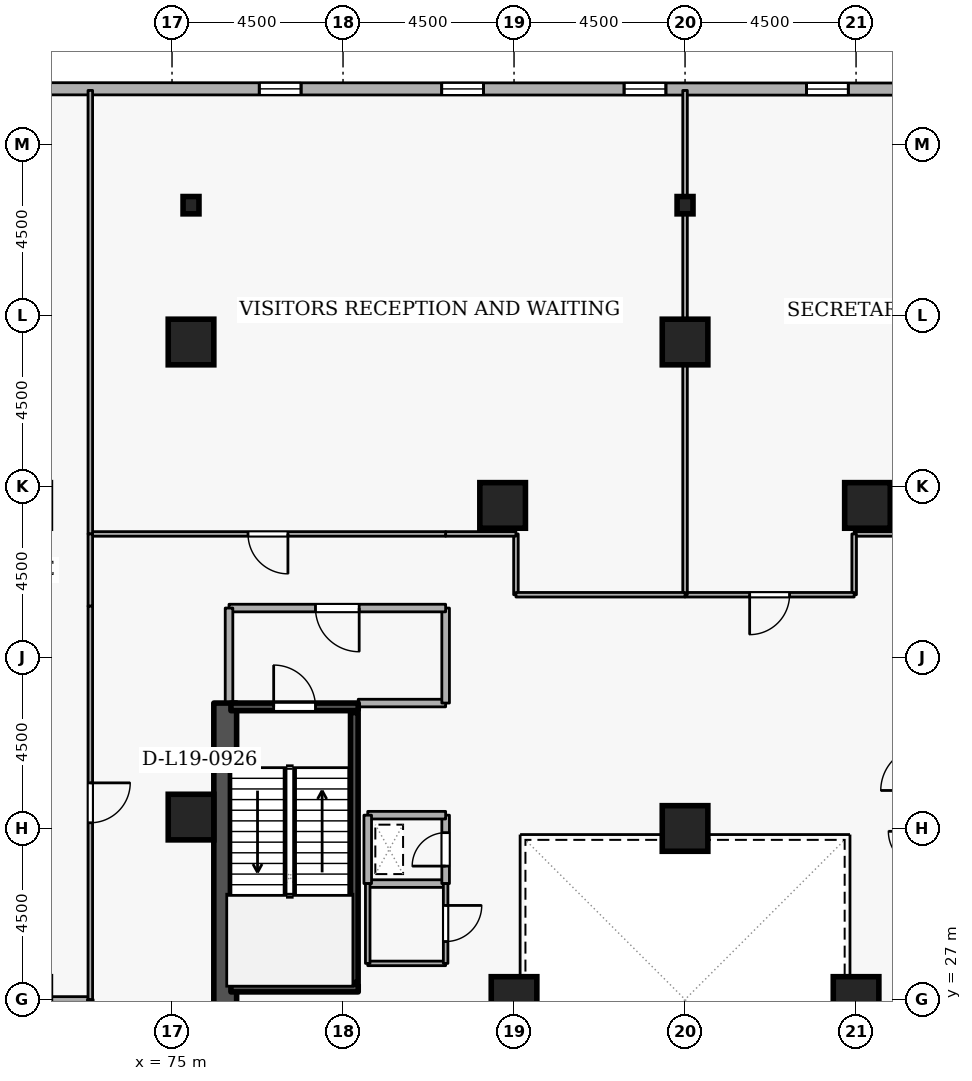
"""IFC4 building model, lengths in metres.
Left out: names, types, materials, properties, quantities, classifications, styles, units other than length and angle.
Written with IfcOpenShell. Run it as: python <this file> out.ifc"""

import sys

from ifc_helpers import new_model, si_unit, direction, frame, frame_2d, origin, origin_2d, place, context, subcontext, project, spatial, rectangle, i_section, extrude, element, fill, save


model = new_model("IFC4")
c1 = context("Model", 3, precision=1e-05, world=origin(), true_north=direction((0.0, 1.0)))
c2 = subcontext(c1, "Body", "Model", "MODEL_VIEW")
j1 = project(units=[si_unit("LENGTHUNIT", "METRE"), si_unit("PLANEANGLEUNIT", "RADIAN")], contexts=[c1])
p1 = place(None, origin())
s1 = spatial("IfcSite", under=j1, at=p1, CompositionType="ELEMENT")
p2 = place(p1, origin())
s2 = spatial("IfcBuilding", under=s1, at=p2, CompositionType="ELEMENT")
p3 = place(p2, frame((0.0, 0.0, 75.9)))
s3 = spatial("IfcBuildingStorey", under=s2, at=p3, CompositionType="ELEMENT", Elevation=75.9)
p4 = place(p3, frame((76.4, 19.2, 0.0), z_axis=(0.0, 0.0, 1.0), x_axis=(0.0, 1.0, 0.0)))
e1 = element("IfcWall", 1, at=p4, inside=s3, PredefinedType="SHEAR", context=c2, shape_type="SweptSolid", body=[
    extrude(rectangle(XDim=15.6, YDim=0.6, at=frame_2d((7.8, 0.0))), origin(), (0.0, 0.0, 1.0), 4.2),
])
for number, where, z_axis, x_axis in (
    (2, (88.5, 44.3, 0.0), (0.0, 0.0, 1.0), (1.0, 0.0, 0.0)),
    (3, (75.5, 44.3, 0.0), (0.0, 0.0, 1.0), (1.0, 0.0, 0.0)),
    (4, (93.3, 40.0, 0.0), (0.0, 0.0, 1.0), (1.0, 0.0, 0.0)),
    (5, (83.7, 40.0, 0.0), (0.0, 0.0, 1.0), (1.0, 0.0, 0.0)),
    (6, (75.5, 31.8, 0.0), (0.0, 0.0, 1.0), (1.0, 0.0, 0.0)),
    (7, (93.0, 27.0, 0.0), (0.0, 0.0, 1.0), (1.0, 0.0, 0.0)),
    (8, (84.0, 27.0, 0.0), (0.0, 0.0, 1.0), (1.0, 0.0, 0.0)),
    (9, (88.5, 31.5, 0.0), (0.0, 0.0, 1.0), (1.0, 0.0, 0.0)),
):
    element("IfcColumn", number, at=place(p3, frame(where, z_axis=z_axis, x_axis=x_axis)), inside=s3, PredefinedType="COLUMN", context=c2, shape_type="SweptSolid", body=[
        extrude(rectangle(XDim=1.2, YDim=1.2, at=origin_2d()), origin(), (0.0, 0.0, 1.0), 4.2),
    ])
for number, where, z_axis, x_axis in (
    (10, (88.5, 47.9, 0.0), (0.0, 0.0, 1.0), (1.0, 0.0, 0.0)),
    (11, (75.5, 47.9, 0.0), (0.0, 0.0, 1.0), (1.0, 0.0, 0.0)),
):
    element("IfcColumn", number, at=place(p3, frame(where, z_axis=z_axis, x_axis=x_axis)), inside=s3, PredefinedType="COLUMN", context=c2, shape_type="SweptSolid", body=[
        extrude(i_section(OverallWidth=0.418, OverallDepth=0.456, WebThickness=0.042, FlangeThickness=0.067, FilletRadius=0.015, at=origin_2d()), origin(), (0.0, 0.0, 1.0), 4.2),
    ])
p5 = place(p3, frame((100.296, 50.953, 0.0), z_axis=(0.0, 0.0, 1.0), x_axis=(-0.99999993762, 0.000353213856, 0.0)))
e12 = element("IfcWall", 12, at=p5, inside=s3, PredefinedType="STANDARD", context=c2, shape_type="SweptSolid", body=[
    extrude(rectangle(XDim=33.177, YDim=0.32, at=frame_2d((16.589, 0.0))), origin(), (0.0, 0.0, 1.0), 3.3),
])
p6 = place(p5, frame((2.7, 0.0, 0.72)))
e13 = element("IfcOpeningElement", 13, at=p6, cuts=e12, PredefinedType="OPENING", context=c2, shape_type="SweptSolid", body=[
    extrude(rectangle(XDim=1.1, YDim=1.8, at=frame_2d((0.55, 0.9))), frame((0.0, 0.17, 0.0), z_axis=(0.0, -1.0, 0.0), x_axis=(1.0, 0.0, 0.0)), (0.0, 0.0, 1.0), 0.34),
])
p7 = place(p5, frame((7.5, 0.0, 0.72)))
e14 = element("IfcOpeningElement", 14, at=p7, cuts=e12, PredefinedType="OPENING", context=c2, shape_type="SweptSolid", body=[
    extrude(rectangle(XDim=1.1, YDim=1.8, at=frame_2d((0.55, 0.9))), frame((0.0, 0.17, 0.0), z_axis=(0.0, -1.0, 0.0), x_axis=(1.0, 0.0, 0.0)), (0.0, 0.0, 1.0), 0.34),
])
p8 = place(p5, frame((12.3, 0.0, 0.72)))
e15 = element("IfcOpeningElement", 15, at=p8, cuts=e12, PredefinedType="OPENING", context=c2, shape_type="SweptSolid", body=[
    extrude(rectangle(XDim=1.1, YDim=1.8, at=frame_2d((0.55, 0.9))), frame((0.0, 0.17, 0.0), z_axis=(0.0, -1.0, 0.0), x_axis=(1.0, 0.0, 0.0)), (0.0, 0.0, 1.0), 0.34),
])
p9 = place(p5, frame((17.1, 0.0, 0.72)))
e16 = element("IfcOpeningElement", 16, at=p9, cuts=e12, PredefinedType="OPENING", context=c2, shape_type="SweptSolid", body=[
    extrude(rectangle(XDim=1.1, YDim=1.8, at=frame_2d((0.55, 0.9))), frame((0.0, 0.17, 0.0), z_axis=(0.0, -1.0, 0.0), x_axis=(1.0, 0.0, 0.0)), (0.0, 0.0, 1.0), 0.34),
])
p10 = place(p5, frame((21.9, 0.0, 0.72)))
e17 = element("IfcOpeningElement", 17, at=p10, cuts=e12, PredefinedType="OPENING", context=c2, shape_type="SweptSolid", body=[
    extrude(rectangle(XDim=1.1, YDim=1.8, at=frame_2d((0.55, 0.9))), frame((0.0, 0.17, 0.0), z_axis=(0.0, -1.0, 0.0), x_axis=(1.0, 0.0, 0.0)), (0.0, 0.0, 1.0), 0.34),
])
p11 = place(p3, frame((76.55, 34.7, 0.0), z_axis=(0.0, 0.0, 1.0), x_axis=(1.0, 0.0, 0.0)))
e18 = element("IfcWall", 18, at=p11, inside=s3, PredefinedType="SHEAR", context=c2, shape_type="SweptSolid", body=[
    extrude(rectangle(XDim=3.35, YDim=0.2, at=frame_2d((1.675, 0.0))), origin(), (0.0, 0.0, 1.0), 4.2),
])
p12 = place(p11, frame((1.125, 0.0, 0.0)))
e19 = element("IfcOpeningElement", 19, at=p12, cuts=e18, PredefinedType="OPENING", context=c2, shape_type="SweptSolid", body=[
    extrude(rectangle(XDim=1.1, YDim=2.1, at=frame_2d((0.55, 1.05))), frame((0.0, 0.11, 0.0), z_axis=(0.0, -1.0, 0.0), x_axis=(1.0, 0.0, 0.0)), (0.0, 0.0, 1.0), 0.22),
])
p13 = place(p3, frame((79.9, 27.3, 0.0), z_axis=(0.0, 0.0, 1.0), x_axis=(-1.0, 0.0, 0.0)))
e20 = element("IfcWall", 20, at=p13, inside=s3, PredefinedType="SHEAR", context=c2, shape_type="SweptSolid", body=[
    extrude(rectangle(XDim=3.35, YDim=0.2, at=frame_2d((1.675, 0.0))), origin(), (0.0, 0.0, 1.0), 4.2),
])
p14 = place(p3, frame((79.797, 27.45, 0.0), z_axis=(0.0, 0.0, 1.0), x_axis=(0.0, 1.0, 0.0)))
e21 = element("IfcWall", 21, at=p14, inside=s3, PredefinedType="SHEAR", context=c2, shape_type="SweptSolid", body=[
    extrude(rectangle(XDim=7.1, YDim=0.2, at=frame_2d((3.55, 0.0))), origin(), (0.0, 0.0, 1.0), 4.2),
])
p15 = place(p3, frame((79.9, 34.8, 0.0), z_axis=(0.0, 0.0, 1.0), x_axis=(1.0, 0.0, 0.0)))
e22 = element("IfcWall", 22, at=p15, inside=s3, PredefinedType="STANDARD", context=c2, shape_type="SweptSolid", body=[
    extrude(rectangle(XDim=2.3, YDim=0.2, at=frame_2d((1.15, 0.0))), origin(), (0.0, 0.0, 1.0), 3.145),
])
p16 = place(p3, frame((82.2, 34.8, 0.0), z_axis=(0.0, 0.0, 1.0), x_axis=(0.0, 1.0, 0.0)))
e23 = element("IfcWall", 23, at=p16, inside=s3, PredefinedType="STANDARD", context=c2, shape_type="SweptSolid", body=[
    extrude(rectangle(XDim=2.5, YDim=0.2, at=frame_2d((1.25, 0.0))), origin(), (0.0, 0.0, 1.0), 3.94),
])
p17 = place(p3, frame((82.2, 37.3, 0.0), z_axis=(0.0, 0.0, 1.0), x_axis=(-1.0, 0.0, 0.0)))
e24 = element("IfcWall", 24, at=p17, inside=s3, PredefinedType="STANDARD", context=c2, shape_type="SweptSolid", body=[
    extrude(rectangle(XDim=5.7, YDim=0.2, at=frame_2d((2.85, 0.0))), origin(), (0.0, 0.0, 1.0), 3.94),
])
p18 = place(p17, frame((2.275, 0.0, 0.0)))
e25 = element("IfcOpeningElement", 25, at=p18, cuts=e24, PredefinedType="OPENING", context=c2, shape_type="SweptSolid", body=[
    extrude(rectangle(XDim=1.15, YDim=2.1, at=frame_2d((0.575, 1.05))), frame((0.0, 0.11, 0.0), z_axis=(0.0, -1.0, 0.0), x_axis=(1.0, 0.0, 0.0)), (0.0, 0.0, 1.0), 0.22),
])
p19 = place(p3, frame((76.5, 37.3, 0.0), z_axis=(0.0, 0.0, 1.0), x_axis=(0.0, -1.0, 0.0)))
e26 = element("IfcWall", 26, at=p19, inside=s3, PredefinedType="STANDARD", context=c2, shape_type="SweptSolid", body=[
    extrude(rectangle(XDim=2.5, YDim=0.2, at=frame_2d((1.25, 0.0))), origin(), (0.0, 0.0, 1.0), 3.94),
])
p20 = place(p3, frame((80.15, 30.05, 0.0), z_axis=(0.0, 0.0, 1.0), x_axis=(1.0, 0.0, 0.0)))
e27 = element("IfcWall", 27, at=p20, inside=s3, PredefinedType="STANDARD", context=c2, shape_type="SweptSolid", body=[
    extrude(rectangle(XDim=2.05, YDim=0.2, at=frame_2d((1.025, 0.0))), origin(), (0.0, 0.0, 1.0), 3.94),
])
p21 = place(p3, frame((82.2, 30.05, 0.0), z_axis=(0.0, 0.0, 1.0), x_axis=(0.0, 1.0, 0.0)))
e28 = element("IfcWall", 28, at=p21, inside=s3, PredefinedType="STANDARD", context=c2, shape_type="SweptSolid", body=[
    extrude(rectangle(XDim=1.8, YDim=0.2, at=frame_2d((0.9, 0.0))), origin(), (0.0, 0.0, 1.0), 3.94),
])
p22 = place(p21, frame((0.46, 0.0, 0.0)))
e29 = element("IfcOpeningElement", 29, at=p22, cuts=e28, PredefinedType="OPENING", context=c2, shape_type="SweptSolid", body=[
    extrude(rectangle(XDim=0.88, YDim=2.04, at=frame_2d((0.44, 1.02))), frame((0.0, 0.11, 0.0), z_axis=(0.0, -1.0, 0.0), x_axis=(1.0, 0.0, 0.0)), (0.0, 0.0, 1.0), 0.22),
])
p23 = place(p3, frame((82.2, 31.85, 0.0), z_axis=(0.0, 0.0, 1.0), x_axis=(-1.0, 0.0, 0.0)))
e30 = element("IfcWall", 30, at=p23, inside=s3, PredefinedType="STANDARD", context=c2, shape_type="SweptSolid", body=[
    extrude(rectangle(XDim=2.05, YDim=0.2, at=frame_2d((1.025, 0.0))), origin(), (0.0, 0.0, 1.0), 3.94),
])
p24 = place(p3, frame((80.15, 31.85, 0.0), z_axis=(0.0, 0.0, 1.0), x_axis=(0.0, -1.0, 0.0)))
e31 = element("IfcWall", 31, at=p24, inside=s3, PredefinedType="STANDARD", context=c2, shape_type="SweptSolid", body=[
    extrude(rectangle(XDim=1.8, YDim=0.2, at=frame_2d((0.9, 0.0))), origin(), (0.0, 0.0, 1.0), 3.94),
])
p25 = place(p3, frame((82.2, 27.95, 0.0), z_axis=(0.0, 0.0, 1.0), x_axis=(-1.0, 0.0, 0.0)))
e32 = element("IfcWall", 32, at=p25, inside=s3, PredefinedType="PARTITIONING", context=c2, shape_type="SweptSolid", body=[
    extrude(rectangle(XDim=2.05, YDim=0.12, at=frame_2d((1.025, 0.0))), origin(), (0.0, 0.0, 1.0), 3.94),
])
p26 = place(p3, frame((80.15, 27.95, 0.0), z_axis=(0.0, 0.0, 1.0), x_axis=(0.0, 1.0, 0.0)))
e33 = element("IfcWall", 33, at=p26, inside=s3, PredefinedType="PARTITIONING", context=c2, shape_type="SweptSolid", body=[
    extrude(rectangle(XDim=2.1, YDim=0.12, at=frame_2d((1.05, 0.0))), origin(), (0.0, 0.0, 1.0), 3.94),
])
p27 = place(p3, frame((82.2, 30.05, 0.0), z_axis=(0.0, 0.0, 1.0), x_axis=(0.0, -1.0, 0.0)))
e34 = element("IfcWall", 34, at=p27, inside=s3, PredefinedType="PARTITIONING", context=c2, shape_type="SweptSolid", body=[
    extrude(rectangle(XDim=2.1, YDim=0.12, at=frame_2d((1.05, 0.0))), origin(), (0.0, 0.0, 1.0), 3.94),
])
p28 = place(p27, frame((0.575, 0.0, 0.0)))
e35 = element("IfcOpeningElement", 35, at=p28, cuts=e34, PredefinedType="OPENING", context=c2, shape_type="SweptSolid", body=[
    extrude(rectangle(XDim=0.95, YDim=2.1, at=frame_2d((0.475, 1.05))), frame((0.0, 0.07, 0.0), z_axis=(0.0, -1.0, 0.0), x_axis=(1.0, 0.0, 0.0)), (0.0, 0.0, 1.0), 0.14),
])
p29 = place(p3, frame((94.8, 39.25, 0.0), z_axis=(0.0, 0.0, 1.0), x_axis=(-1.0, 0.0, 0.0)))
e36 = element("IfcWall", 36, at=p29, inside=s3, PredefinedType="PARTITIONING", context=c2, shape_type="SweptSolid", body=[
    extrude(rectangle(XDim=1.85, YDim=0.12, at=frame_2d((0.925, 0.0))), origin(), (0.0, 0.0, 1.0), 3.94),
])
p30 = place(p3, frame((92.95, 39.25, 0.0), z_axis=(0.0, 0.0, 1.0), x_axis=(0.0, -1.0, 0.0)))
e37 = element("IfcWall", 37, at=p30, inside=s3, PredefinedType="PARTITIONING", context=c2, shape_type="SweptSolid", body=[
    extrude(rectangle(XDim=1.6, YDim=0.12, at=frame_2d((0.8, 0.0))), origin(), (0.0, 0.0, 1.0), 3.94),
])
p31 = place(p3, frame((92.95, 37.65, 0.0), z_axis=(0.0, 0.0, 1.0), x_axis=(-1.0, 0.0, 0.0)))
e38 = element("IfcWall", 38, at=p31, inside=s3, PredefinedType="PARTITIONING", context=c2, shape_type="SweptSolid", body=[
    extrude(rectangle(XDim=4.45, YDim=0.12, at=frame_2d((2.225, 0.0))), origin(), (0.0, 0.0, 1.0), 3.94),
])
p32 = place(p31, frame((1.7, 0.0, 0.0)))
e39 = element("IfcOpeningElement", 39, at=p32, cuts=e38, PredefinedType="OPENING", context=c2, shape_type="SweptSolid", body=[
    extrude(rectangle(XDim=1.05, YDim=2.1, at=frame_2d((0.525, 1.05))), frame((0.0, 0.07, 0.0), z_axis=(0.0, -1.0, 0.0), x_axis=(1.0, 0.0, 0.0)), (0.0, 0.0, 1.0), 0.14),
])
p33 = place(p3, frame((88.5, 37.65, 0.0), z_axis=(0.0, 0.0, 1.0), x_axis=(0.0, 1.0, 0.0)))
e40 = element("IfcWall", 40, at=p33, inside=s3, PredefinedType="PARTITIONING", context=c2, shape_type="SweptSolid", body=[
    extrude(rectangle(XDim=13.27, YDim=0.12, at=frame_2d((6.635, 0.0))), origin(), (0.0, 0.0, 1.0), 3.482),
])
p34 = place(p3, frame((84.05, 37.65, 0.0), z_axis=(0.0, 0.0, 1.0), x_axis=(0.0, 1.0, 0.0)))
e41 = element("IfcWall", 41, at=p34, inside=s3, PredefinedType="PARTITIONING", context=c2, shape_type="SweptSolid", body=[
    extrude(rectangle(XDim=1.6, YDim=0.12, at=frame_2d((0.8, 0.0))), origin(), (0.0, 0.0, 1.0), 3.94),
])
p35 = place(p3, frame((84.05, 39.25, 0.0), z_axis=(0.0, 0.0, 1.0), x_axis=(-1.0, 0.0, 0.0)))
e42 = element("IfcWall", 42, at=p35, inside=s3, PredefinedType="PARTITIONING", context=c2, shape_type="SweptSolid", body=[
    extrude(rectangle(XDim=1.85, YDim=0.12, at=frame_2d((0.925, 0.0))), origin(), (0.0, 0.0, 1.0), 3.94),
])
p36 = place(p3, frame((82.2, 39.25, 0.0), z_axis=(0.0, 0.0, 1.0), x_axis=(-1.0, 0.0, 0.0)))
e43 = element("IfcWall", 43, at=p36, inside=s3, PredefinedType="PARTITIONING", context=c2, shape_type="SweptSolid", body=[
    extrude(rectangle(XDim=9.35, YDim=0.12, at=frame_2d((4.675, 0.0))), origin(), (0.0, 0.0, 1.0), 3.94),
])
p37 = place(p36, frame((4.15, 0.0, 0.0)))
e44 = element("IfcOpeningElement", 44, at=p37, cuts=e43, PredefinedType="OPENING", context=c2, shape_type="SweptSolid", body=[
    extrude(rectangle(XDim=1.05, YDim=2.1, at=frame_2d((0.525, 1.05))), frame((0.0, 0.07, 0.0), z_axis=(0.0, -1.0, 0.0), x_axis=(1.0, 0.0, 0.0)), (0.0, 0.0, 1.0), 0.14),
])
p38 = place(p3, frame((72.85, 39.25, 0.0), z_axis=(0.0, 0.0, 1.0), x_axis=(0.0, 1.0, 0.0)))
e45 = element("IfcWall", 45, at=p38, inside=s3, PredefinedType="PARTITIONING", context=c2, shape_type="SweptSolid", body=[
    extrude(rectangle(XDim=11.67, YDim=0.12, at=frame_2d((5.835, 0.0))), origin(), (0.0, 0.0, 1.0), 3.94),
])
p39 = place(p3, frame((88.5, 37.65, 0.0), z_axis=(0.0, 0.0, 1.0), x_axis=(-1.0, 0.0, 0.0)))
e46 = element("IfcWall", 46, at=p39, inside=s3, PredefinedType="PARTITIONING", context=c2, shape_type="SweptSolid", body=[
    extrude(rectangle(XDim=4.45, YDim=0.12, at=frame_2d((2.225, 0.0))), origin(), (0.0, 0.0, 1.0), 3.94),
])
p40 = place(p3, frame((64.58, 27.0, 0.0), z_axis=(0.0, 0.0, 1.0), x_axis=(1.0, 0.0, 0.0)))
e47 = element("IfcWall", 47, at=p40, inside=s3, PredefinedType="PARTITIONING", context=c2, shape_type="SweptSolid", body=[
    extrude(rectangle(XDim=8.27, YDim=0.15, at=frame_2d((4.135, 0.0))), origin(), (0.0, 0.0, 1.0), 3.482),
])
p41 = place(p3, frame((72.85, 27.0, 0.0), z_axis=(0.0, 0.0, 1.0), x_axis=(0.0, -1.0, 0.0)))
e48 = element("IfcWall", 48, at=p41, inside=s3, PredefinedType="PARTITIONING", context=c2, shape_type="SweptSolid", body=[
    extrude(rectangle(XDim=12.25, YDim=0.15, at=frame_2d((6.125, 0.0))), origin(), (0.0, 0.0, 1.0), 3.94),
])
p42 = place(p41, frame((5.475, 0.0, 0.0)))
e49 = element("IfcOpeningElement", 49, at=p42, cuts=e48, PredefinedType="OPENING", context=c2, shape_type="SweptSolid", body=[
    extrude(rectangle(XDim=1.3, YDim=2.12, at=frame_2d((0.65, 1.06))), frame((0.0, 0.085, 0.0), z_axis=(0.0, -1.0, 0.0), x_axis=(1.0, 0.0, 0.0)), (0.0, 0.0, 1.0), 0.17),
])
p43 = place(p3, frame((72.85, 39.25, 0.0), z_axis=(0.0, 0.0, 1.0), x_axis=(0.0, -1.0, 0.0)))
e50 = element("IfcWall", 50, at=p43, inside=s3, PredefinedType="PARTITIONING", context=c2, shape_type="SweptSolid", body=[
    extrude(rectangle(XDim=1.9, YDim=0.12, at=frame_2d((0.95, 0.0))), origin(), (0.0, 0.0, 1.0), 3.495),
])
p44 = place(p3, frame((72.85, 37.35, 0.0), z_axis=(0.0, 0.0, 1.0), x_axis=(0.0, -1.0, 0.0)))
e51 = element("IfcWall", 51, at=p44, inside=s3, PredefinedType="PARTITIONING", context=c2, shape_type="SweptSolid", body=[
    extrude(rectangle(XDim=10.35, YDim=0.12, at=frame_2d((5.175, 0.0))), origin(), (0.0, 0.0, 1.0), 3.495),
])
p45 = place(p44, frame((4.65, 0.0, 0.0)))
e52 = element("IfcOpeningElement", 52, at=p45, cuts=e51, PredefinedType="OPENING", context=c2, shape_type="SweptSolid", body=[
    extrude(rectangle(XDim=1.05, YDim=2.1, at=frame_2d((0.525, 1.05))), frame((0.0, 0.07, 0.0), z_axis=(0.0, -1.0, 0.0), x_axis=(1.0, 0.0, 0.0)), (0.0, 0.0, 1.0), 0.14),
])
p46 = place(p7, origin())
e53 = element("IfcWindow", 53, at=p46, inside=s3, PartitioningType="SINGLE_PANEL", PredefinedType="WINDOW", context=c2, shape_type="SweptSolid", body=[
    extrude(rectangle(XDim=1.1, YDim=1.8, at=frame_2d((0.55, 0.9))), frame((0.0, 0.03, 0.0), z_axis=(0.0, -1.0, 0.0), x_axis=(1.0, 0.0, 0.0)), (0.0, 0.0, 1.0), 0.06),
])
fill(e14, e53)
p47 = place(p8, origin())
e54 = element("IfcWindow", 54, at=p47, inside=s3, PartitioningType="SINGLE_PANEL", PredefinedType="WINDOW", context=c2, shape_type="SweptSolid", body=[
    extrude(rectangle(XDim=1.1, YDim=1.8, at=frame_2d((0.55, 0.9))), frame((0.0, 0.03, 0.0), z_axis=(0.0, -1.0, 0.0), x_axis=(1.0, 0.0, 0.0)), (0.0, 0.0, 1.0), 0.06),
])
fill(e15, e54)
p48 = place(p9, origin())
e55 = element("IfcWindow", 55, at=p48, inside=s3, PartitioningType="SINGLE_PANEL", PredefinedType="WINDOW", context=c2, shape_type="SweptSolid", body=[
    extrude(rectangle(XDim=1.1, YDim=1.8, at=frame_2d((0.55, 0.9))), frame((0.0, 0.03, 0.0), z_axis=(0.0, -1.0, 0.0), x_axis=(1.0, 0.0, 0.0)), (0.0, 0.0, 1.0), 0.06),
])
fill(e16, e55)
p49 = place(p10, origin())
e56 = element("IfcWindow", 56, at=p49, inside=s3, PartitioningType="SINGLE_PANEL", PredefinedType="WINDOW", context=c2, shape_type="SweptSolid", body=[
    extrude(rectangle(XDim=1.1, YDim=1.8, at=frame_2d((0.55, 0.9))), frame((0.0, 0.03, 0.0), z_axis=(0.0, -1.0, 0.0), x_axis=(1.0, 0.0, 0.0)), (0.0, 0.0, 1.0), 0.06),
])
fill(e17, e56)
p50 = place(p12, origin())
e57 = element("IfcDoor", 57, at=p50, inside=s3, OperationType="SINGLE_SWING_LEFT", PredefinedType="DOOR", context=c2, shape_type="SweptSolid", body=[
    extrude(rectangle(XDim=1.1, YDim=2.1, at=frame_2d((0.55, 1.05))), frame((0.0, 0.025, 0.0), z_axis=(0.0, -1.0, 0.0), x_axis=(1.0, 0.0, 0.0)), (0.0, 0.0, 1.0), 0.05),
])
fill(e19, e57)
p51 = place(p18, origin())
e58 = element("IfcDoor", 58, at=p51, inside=s3, OperationType="SINGLE_SWING_LEFT", PredefinedType="DOOR", context=c2, shape_type="SweptSolid", body=[
    extrude(rectangle(XDim=1.15, YDim=2.1, at=frame_2d((0.575, 1.05))), frame((0.0, 0.025, 0.0), z_axis=(0.0, -1.0, 0.0), x_axis=(1.0, 0.0, 0.0)), (0.0, 0.0, 1.0), 0.05),
])
fill(e25, e58)
p52 = place(p22, origin())
e59 = element("IfcDoor", 59, at=p52, inside=s3, OperationType="SINGLE_SWING_LEFT", PredefinedType="DOOR", context=c2, shape_type="SweptSolid", body=[
    extrude(rectangle(XDim=0.88, YDim=2.04, at=frame_2d((0.44, 1.02))), frame((0.0, 0.025, 0.0), z_axis=(0.0, -1.0, 0.0), x_axis=(1.0, 0.0, 0.0)), (0.0, 0.0, 1.0), 0.05),
])
fill(e29, e59)
p53 = place(p28, origin())
e60 = element("IfcDoor", 60, at=p53, inside=s3, OperationType="SINGLE_SWING_LEFT", PredefinedType="DOOR", context=c2, shape_type="SweptSolid", body=[
    extrude(rectangle(XDim=0.95, YDim=2.1, at=frame_2d((0.475, 1.05))), frame((0.0, 0.025, 0.0), z_axis=(0.0, -1.0, 0.0), x_axis=(1.0, 0.0, 0.0)), (0.0, 0.0, 1.0), 0.05),
])
fill(e35, e60)
p54 = place(p32, origin())
e61 = element("IfcDoor", 61, at=p54, inside=s3, OperationType="SINGLE_SWING_RIGHT", PredefinedType="DOOR", context=c2, shape_type="SweptSolid", body=[
    extrude(rectangle(XDim=1.05, YDim=2.1, at=frame_2d((0.525, 1.05))), frame((0.0, 0.025, 0.0), z_axis=(0.0, -1.0, 0.0), x_axis=(1.0, 0.0, 0.0)), (0.0, 0.0, 1.0), 0.05),
])
fill(e39, e61)
p55 = place(p37, origin())
e62 = element("IfcDoor", 62, at=p55, inside=s3, OperationType="SINGLE_SWING_LEFT", PredefinedType="DOOR", context=c2, shape_type="SweptSolid", body=[
    extrude(rectangle(XDim=1.05, YDim=2.1, at=frame_2d((0.525, 1.05))), frame((0.0, 0.025, 0.0), z_axis=(0.0, -1.0, 0.0), x_axis=(1.0, 0.0, 0.0)), (0.0, 0.0, 1.0), 0.05),
])
fill(e44, e62)
p56 = place(p45, origin())
e63 = element("IfcDoor", 63, at=p56, inside=s3, OperationType="SINGLE_SWING_LEFT", PredefinedType="DOOR", context=c2, shape_type="SweptSolid", body=[
    extrude(rectangle(XDim=1.05, YDim=2.1, at=frame_2d((0.525, 1.05))), frame((0.0, 0.025, 0.0), z_axis=(0.0, -1.0, 0.0), x_axis=(1.0, 0.0, 0.0)), (0.0, 0.0, 1.0), 0.05),
])
fill(e52, e63)
save(model, sys.argv[1])
